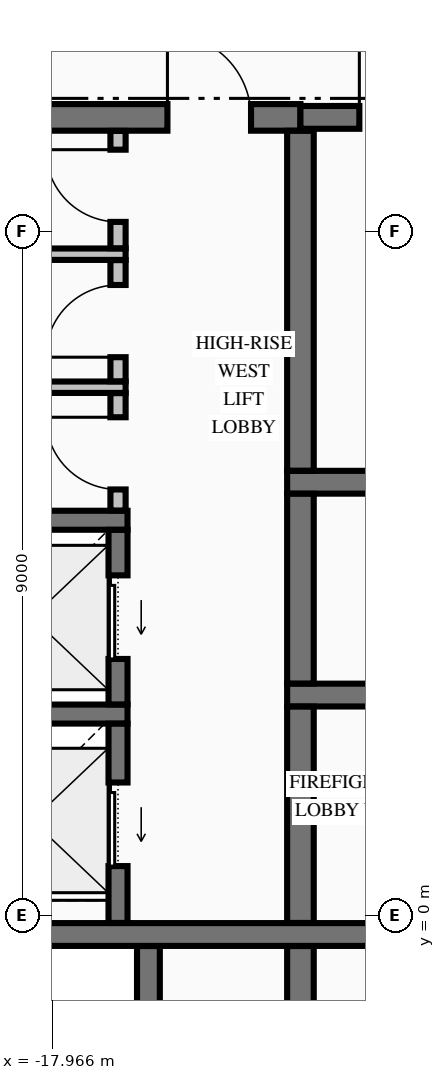
"""IFC4 building model, lengths in metres.
Left out: names, types, materials, properties, quantities, classifications, styles, units other than length and angle.
Written with IfcOpenShell. Run it as: python <this file> out.ifc"""

import sys

from ifc_helpers import new_model, si_unit, direction, frame, frame_2d, origin, place, context, subcontext, project, spatial, rectangle, extrude, element, fill, save


model = new_model("IFC4")
c1 = context("Model", 3, precision=1e-05, world=origin(), true_north=direction((0.0, 1.0)))
c2 = subcontext(c1, "Body", "Model", "MODEL_VIEW")
j1 = project(units=[si_unit("LENGTHUNIT", "METRE"), si_unit("PLANEANGLEUNIT", "RADIAN")], contexts=[c1])
p1 = place(None, origin())
s1 = spatial("IfcSite", under=j1, at=p1, CompositionType="ELEMENT")
p2 = place(p1, origin())
s2 = spatial("IfcBuilding", under=s1, at=p2, CompositionType="ELEMENT")
p3 = place(p2, frame((0.0, 0.0, 257.66)))
s3 = spatial("IfcBuildingStorey", under=s2, at=p3, CompositionType="ELEMENT", Elevation=257.66)
p4 = place(p3, frame((-19.646, -0.25, 0.0), z_axis=(0.0, 0.0, 1.0), x_axis=(1.0, 0.0, 0.0)))
e1 = element("IfcWall", 1, at=p4, inside=s3, PredefinedType="SHEAR", context=c2, shape_type="SweptSolid", body=[
    extrude(rectangle(XDim=8.292, YDim=0.3, at=frame_2d((4.146, 0.0))), origin(), (0.0, 0.0, 1.0), 2.98),
])
p5 = place(p4, frame((5.946, 0.0, 0.0)))
e2 = element("IfcOpeningElement", 2, at=p5, cuts=e1, PredefinedType="OPENING", context=c2, shape_type="SweptSolid", body=[
    extrude(rectangle(XDim=1.1, YDim=2.15, at=frame_2d((0.55, 1.075))), frame((0.0, 0.16, 0.0), z_axis=(0.0, -1.0, 0.0), x_axis=(1.0, 0.0, 0.0)), (0.0, 0.0, 1.0), 0.32),
])
p6 = place(p3, frame((-20.175, 2.65, 0.0), z_axis=(0.0, 0.0, 1.0), x_axis=(1.0, 0.0, 0.0)))
e3 = element("IfcWall", 3, at=p6, inside=s3, PredefinedType="SOLIDWALL", context=c2, shape_type="SweptSolid", body=[
    extrude(rectangle(XDim=3.2, YDim=0.25, at=frame_2d((1.6, 0.0))), origin(), (0.0, 0.0, 1.0), 2.98),
])
p7 = place(p3, frame((-14.875, 2.9, 0.0), z_axis=(0.0, 0.0, 1.0), x_axis=(1.0, 0.0, 0.0)))
e4 = element("IfcWall", 4, at=p7, inside=s3, PredefinedType="SHEAR", context=c2, shape_type="SweptSolid", body=[
    extrude(rectangle(XDim=4.025, YDim=0.3, at=frame_2d((2.012, 0.0))), origin(), (0.0, 0.0, 1.0), 2.98),
])
p8 = place(p7, frame((2.075, 0.0, 0.0)))
e5 = element("IfcOpeningElement", 5, at=p8, cuts=e4, PredefinedType="OPENING", context=c2, shape_type="SweptSolid", body=[
    extrude(rectangle(XDim=1.1, YDim=2.2, at=frame_2d((0.55, 1.1))), frame((0.0, 0.16, 0.0), z_axis=(0.0, -1.0, 0.0), x_axis=(1.0, 0.0, 0.0)), (0.0, 0.0, 1.0), 0.32),
])
p9 = place(p3, frame((-20.175, 5.2, 0.0), z_axis=(0.0, 0.0, 1.0), x_axis=(1.0, 0.0, 0.0)))
e6 = element("IfcWall", 6, at=p9, inside=s3, PredefinedType="SOLIDWALL", context=c2, shape_type="SweptSolid", body=[
    extrude(rectangle(XDim=3.2, YDim=0.25, at=frame_2d((1.6, 0.0))), origin(), (0.0, 0.0, 1.0), 2.98),
])
p10 = place(p3, frame((-14.875, 5.7, 0.0), z_axis=(0.0, 0.0, 1.0), x_axis=(1.0, 0.0, 0.0)))
e7 = element("IfcWall", 7, at=p10, inside=s3, PredefinedType="SHEAR", context=c2, shape_type="SweptSolid", body=[
    extrude(rectangle(XDim=4.025, YDim=0.3, at=frame_2d((2.012, 0.0))), origin(), (0.0, 0.0, 1.0), 2.98),
])
p11 = place(p3, frame((-19.646, 10.5, 0.0), z_axis=(0.0, 0.0, 1.0), x_axis=(1.0, 0.0, 0.0)))
e8 = element("IfcWall", 8, at=p11, inside=s3, PredefinedType="SHEAR", context=c2, shape_type="SweptSolid", body=[
    extrude(rectangle(XDim=4.946, YDim=0.35, at=frame_2d((2.473, 0.0))), origin(), (0.0, 0.0, 1.0), 2.98),
])
p12 = place(p11, frame((3.196, 0.0, 0.0)))
e9 = element("IfcOpeningElement", 9, at=p12, cuts=e8, PredefinedType="OPENING", context=c2, shape_type="SweptSolid", body=[
    extrude(rectangle(XDim=1.1, YDim=2.15, at=frame_2d((0.55, 1.075))), frame((0.0, 0.185, 0.0), z_axis=(0.0, -1.0, 0.0), x_axis=(1.0, 0.0, 0.0)), (0.0, 0.0, 1.0), 0.37),
])
p13 = place(p3, frame((-14.7, 10.5, 0.0), z_axis=(0.0, 0.0, 1.0), x_axis=(1.0, 0.0, 0.0)))
e10 = element("IfcWall", 10, at=p13, inside=s3, PredefinedType="SHEAR", context=c2, shape_type="SweptSolid", body=[
    extrude(rectangle(XDim=3.346, YDim=0.3, at=frame_2d((1.673, 0.0))), origin(), (0.0, 0.0, 1.0), 2.98),
])
p14 = place(p13, frame((0.775, 0.0, 0.0)))
e11 = element("IfcOpeningElement", 11, at=p14, cuts=e10, PredefinedType="OPENING", context=c2, shape_type="SweptSolid", body=[
    extrude(rectangle(XDim=0.95, YDim=2.15, at=frame_2d((0.475, 1.075))), frame((0.0, 0.16, 0.0), z_axis=(0.0, -1.0, 0.0), x_axis=(1.0, 0.0, 0.0)), (0.0, 0.0, 1.0), 0.32),
])
for number, where, z_axis, x_axis in (
    (12, (-19.822, 6.95, 0.0), (0.0, 0.0, 1.0), (1.0, 0.0, 0.0)),
    (13, (-19.822, 8.7, 0.0), (0.0, 0.0, 1.0), (1.0, 0.0, 0.0)),
):
    element("IfcWall", number, at=place(p3, frame(where, z_axis=z_axis, x_axis=x_axis)), inside=s3, PredefinedType="PARTITIONING", context=c2, shape_type="SweptSolid", body=[
        extrude(rectangle(XDim=2.822, YDim=0.15, at=frame_2d((1.411, 0.0))), origin(), (0.0, 0.0, 1.0), 2.98),
    ])
p15 = place(p3, frame((-17.1, -0.098, 0.0), z_axis=(0.0, 0.0, 1.0), x_axis=(0.0, 1.0, 0.0)))
e14 = element("IfcWall", 14, at=p15, inside=s3, PredefinedType="SOLIDWALL", context=c2, shape_type="SweptSolid", body=[
    extrude(rectangle(XDim=2.621, YDim=0.25, at=frame_2d((1.311, 0.0))), origin(), (0.0, 0.0, 1.0), 2.98),
])
p16 = place(p15, frame((0.748, 0.0, 0.0)))
e15 = element("IfcOpeningElement", 15, at=p16, cuts=e14, PredefinedType="OPENING", context=c2, shape_type="SweptSolid", body=[
    extrude(rectangle(XDim=1.1, YDim=2.2, at=frame_2d((0.55, 1.1))), frame((0.0, 0.135, 0.0), z_axis=(0.0, -1.0, 0.0), x_axis=(1.0, 0.0, 0.0)), (0.0, 0.0, 1.0), 0.27),
])
p17 = place(p3, frame((-17.1, 2.777, 0.0), z_axis=(0.0, 0.0, 1.0), x_axis=(0.0, 1.0, 0.0)))
e16 = element("IfcWall", 16, at=p17, inside=s3, PredefinedType="SOLIDWALL", context=c2, shape_type="SweptSolid", body=[
    extrude(rectangle(XDim=2.296, YDim=0.25, at=frame_2d((1.148, 0.0))), origin(), (0.0, 0.0, 1.0), 2.98),
])
p18 = place(p17, frame((0.598, 0.0, 0.0)))
e17 = element("IfcOpeningElement", 17, at=p18, cuts=e16, PredefinedType="OPENING", context=c2, shape_type="SweptSolid", body=[
    extrude(rectangle(XDim=1.1, YDim=2.2, at=frame_2d((0.55, 1.1))), frame((0.0, 0.135, 0.0), z_axis=(0.0, -1.0, 0.0), x_axis=(1.0, 0.0, 0.0)), (0.0, 0.0, 1.0), 0.27),
])
p19 = place(p3, frame((-16.7, -9.773, 0.0), z_axis=(0.0, 0.0, 1.0), x_axis=(0.0, 1.0, 0.0)))
e18 = element("IfcWall", 18, at=p19, inside=s3, PredefinedType="SHEAR", context=c2, shape_type="SweptSolid", body=[
    extrude(rectangle(XDim=9.371, YDim=0.3, at=frame_2d((4.686, 0.0))), origin(), (0.0, 0.0, 1.0), 2.98),
])
p20 = place(p3, frame((-14.7, -9.773, 0.0), z_axis=(0.0, 0.0, 1.0), x_axis=(0.0, 1.0, 0.0)))
e19 = element("IfcWall", 19, at=p20, inside=s3, PredefinedType="SHEAR", context=c2, shape_type="SweptSolid", body=[
    extrude(rectangle(XDim=9.371, YDim=0.35, at=frame_2d((4.686, 0.0))), origin(), (0.0, 0.0, 1.0), 2.98),
])
p21 = place(p3, frame((-14.7, -0.098, 0.0), z_axis=(0.0, 0.0, 1.0), x_axis=(0.0, 1.0, 0.0)))
e20 = element("IfcWall", 20, at=p21, inside=s3, PredefinedType="SHEAR", context=c2, shape_type="SweptSolid", body=[
    extrude(rectangle(XDim=2.846, YDim=0.35, at=frame_2d((1.423, 0.0))), origin(), (0.0, 0.0, 1.0), 2.98),
])
p22 = place(p3, frame((-14.7, 3.052, 0.0), z_axis=(0.0, 0.0, 1.0), x_axis=(0.0, 1.0, 0.0)))
e21 = element("IfcWall", 21, at=p22, inside=s3, PredefinedType="SHEAR", context=c2, shape_type="SweptSolid", body=[
    extrude(rectangle(XDim=2.496, YDim=0.35, at=frame_2d((1.248, 0.0))), origin(), (0.0, 0.0, 1.0), 2.98),
])
p23 = place(p3, frame((-14.7, 5.852, 0.0), z_axis=(0.0, 0.0, 1.0), x_axis=(0.0, 1.0, 0.0)))
e22 = element("IfcWall", 22, at=p23, inside=s3, PredefinedType="SHEAR", context=c2, shape_type="SweptSolid", body=[
    extrude(rectangle(XDim=4.471, YDim=0.35, at=frame_2d((2.235, 0.0))), origin(), (0.0, 0.0, 1.0), 2.98),
])
p24 = place(p3, frame((-17.1, 5.328, 0.0), z_axis=(0.0, 0.0, 1.0), x_axis=(0.0, 1.0, 0.0)))
e23 = element("IfcWall", 23, at=p24, inside=s3, PredefinedType="PARTITIONING", context=c2, shape_type="SweptSolid", body=[
    extrude(rectangle(XDim=1.544, YDim=0.2, at=frame_2d((0.772, 0.0))), origin(), (0.0, 0.0, 1.0), 2.98),
])
p25 = place(p24, frame((0.277, 0.0, 0.0)))
e24 = element("IfcOpeningElement", 24, at=p25, cuts=e23, PredefinedType="OPENING", context=c2, shape_type="SweptSolid", body=[
    extrude(rectangle(XDim=0.95, YDim=2.15, at=frame_2d((0.475, 1.075))), frame((0.0, 0.11, 0.0), z_axis=(0.0, -1.0, 0.0), x_axis=(1.0, 0.0, 0.0)), (0.0, 0.0, 1.0), 0.22),
])
p26 = place(p3, frame((-17.1, 7.028, 0.0), z_axis=(0.0, 0.0, 1.0), x_axis=(0.0, 1.0, 0.0)))
e25 = element("IfcWall", 25, at=p26, inside=s3, PredefinedType="PARTITIONING", context=c2, shape_type="SweptSolid", body=[
    extrude(rectangle(XDim=1.594, YDim=0.2, at=frame_2d((0.797, 0.0))), origin(), (0.0, 0.0, 1.0), 2.98),
])
p27 = place(p26, frame((0.317, 0.0, 0.0)))
e26 = element("IfcOpeningElement", 26, at=p27, cuts=e25, PredefinedType="OPENING", context=c2, shape_type="SweptSolid", body=[
    extrude(rectangle(XDim=0.95, YDim=2.15, at=frame_2d((0.475, 1.075))), frame((0.0, 0.11, 0.0), z_axis=(0.0, -1.0, 0.0), x_axis=(1.0, 0.0, 0.0)), (0.0, 0.0, 1.0), 0.22),
])
p28 = place(p3, frame((-17.1, 8.778, 0.0), z_axis=(0.0, 0.0, 1.0), x_axis=(0.0, 1.0, 0.0)))
e27 = element("IfcWall", 27, at=p28, inside=s3, PredefinedType="PARTITIONING", context=c2, shape_type="SweptSolid", body=[
    extrude(rectangle(XDim=1.544, YDim=0.2, at=frame_2d((0.772, 0.0))), origin(), (0.0, 0.0, 1.0), 2.98),
])
p29 = place(p28, frame((0.347, 0.0, 0.0)))
e28 = element("IfcOpeningElement", 28, at=p29, cuts=e27, PredefinedType="OPENING", context=c2, shape_type="SweptSolid", body=[
    extrude(rectangle(XDim=0.95, YDim=2.15, at=frame_2d((0.475, 1.075))), frame((0.0, 0.11, 0.0), z_axis=(0.0, -1.0, 0.0), x_axis=(1.0, 0.0, 0.0)), (0.0, 0.0, 1.0), 0.22),
])
p30 = place(p14, origin())
e29 = element("IfcDoor", 29, at=p30, inside=s3, OperationType="SINGLE_SWING_LEFT", PredefinedType="DOOR", context=c2, shape_type="SweptSolid", body=[
    extrude(rectangle(XDim=0.95, YDim=2.15, at=frame_2d((0.475, 1.075))), frame((0.0, 0.025, 0.0), z_axis=(0.0, -1.0, 0.0), x_axis=(1.0, 0.0, 0.0)), (0.0, 0.0, 1.0), 0.05),
])
fill(e11, e29)
p31 = place(p16, origin())
e30 = element("IfcDoor", 30, at=p31, inside=s3, OperationType="SLIDING_TO_LEFT", PredefinedType="DOOR", context=c2, shape_type="SweptSolid", body=[
    extrude(rectangle(XDim=1.1, YDim=2.2, at=frame_2d((0.55, 1.1))), frame((0.0, 0.025, 0.0), z_axis=(0.0, -1.0, 0.0), x_axis=(1.0, 0.0, 0.0)), (0.0, 0.0, 1.0), 0.05),
])
fill(e15, e30)
p32 = place(p18, origin())
e31 = element("IfcDoor", 31, at=p32, inside=s3, OperationType="SLIDING_TO_LEFT", PredefinedType="DOOR", context=c2, shape_type="SweptSolid", body=[
    extrude(rectangle(XDim=1.1, YDim=2.2, at=frame_2d((0.55, 1.1))), frame((0.0, 0.025, 0.0), z_axis=(0.0, -1.0, 0.0), x_axis=(1.0, 0.0, 0.0)), (0.0, 0.0, 1.0), 0.05),
])
fill(e17, e31)
p33 = place(p12, origin())
e32 = element("IfcDoor", 32, at=p33, inside=s3, OperationType="SINGLE_SWING_LEFT", PredefinedType="DOOR", context=c2, shape_type="SweptSolid", body=[
    extrude(rectangle(XDim=1.1, YDim=2.15, at=frame_2d((0.55, 1.075))), frame((0.0, 0.025, 0.0), z_axis=(0.0, -1.0, 0.0), x_axis=(1.0, 0.0, 0.0)), (0.0, 0.0, 1.0), 0.05),
])
fill(e9, e32)
p34 = place(p29, origin())
e33 = element("IfcDoor", 33, at=p34, inside=s3, OperationType="SINGLE_SWING_RIGHT", PredefinedType="DOOR", context=c2, shape_type="SweptSolid", body=[
    extrude(rectangle(XDim=0.95, YDim=2.15, at=frame_2d((0.475, 1.075))), frame((0.0, 0.025, 0.0), z_axis=(0.0, -1.0, 0.0), x_axis=(1.0, 0.0, 0.0)), (0.0, 0.0, 1.0), 0.05),
])
fill(e28, e33)
p35 = place(p27, origin())
e34 = element("IfcDoor", 34, at=p35, inside=s3, OperationType="SINGLE_SWING_LEFT", PredefinedType="DOOR", context=c2, shape_type="SweptSolid", body=[
    extrude(rectangle(XDim=0.95, YDim=2.15, at=frame_2d((0.475, 1.075))), frame((0.0, 0.025, 0.0), z_axis=(0.0, -1.0, 0.0), x_axis=(1.0, 0.0, 0.0)), (0.0, 0.0, 1.0), 0.05),
])
fill(e26, e34)
p36 = place(p25, origin())
e35 = element("IfcDoor", 35, at=p36, inside=s3, OperationType="SINGLE_SWING_RIGHT", PredefinedType="DOOR", context=c2, shape_type="SweptSolid", body=[
    extrude(rectangle(XDim=0.95, YDim=2.15, at=frame_2d((0.475, 1.075))), frame((0.0, 0.025, 0.0), z_axis=(0.0, -1.0, 0.0), x_axis=(1.0, 0.0, 0.0)), (0.0, 0.0, 1.0), 0.05),
])
fill(e24, e35)
save(model, sys.argv[1])
